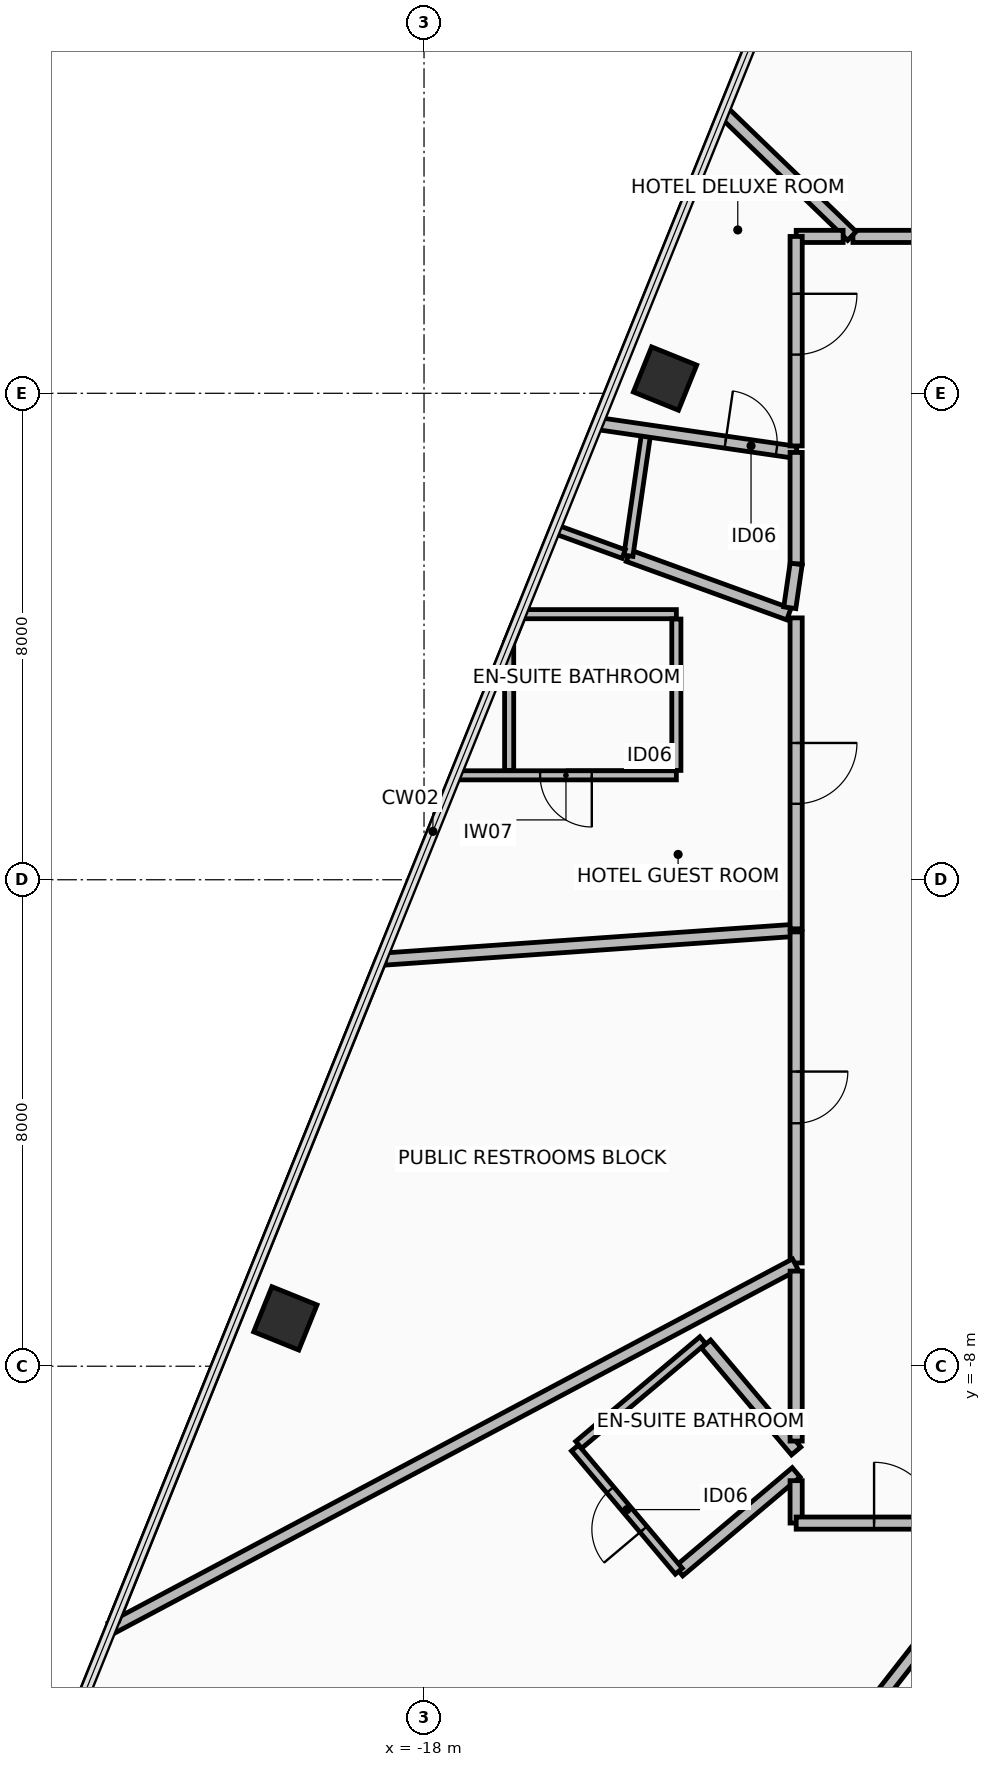
"""IFC4 building model, lengths in metres.
Left out: names, types, materials, properties, quantities, classifications, styles, units other than length and angle.
Written with IfcOpenShell. Run it as: python <this file> out.ifc"""

import sys

from ifc_helpers import new_model, si_unit, direction, frame, frame_2d, origin, origin_2d, place, context, subcontext, project, spatial, rectangle, hollow_rectangle, extrude, element, fill, save


model = new_model("IFC4")
c1 = context("Model", 3, precision=1e-05, world=origin(), true_north=direction((0.0, 1.0)))
c2 = subcontext(c1, "Body", "Model", "MODEL_VIEW")
j1 = project(units=[si_unit("LENGTHUNIT", "METRE"), si_unit("PLANEANGLEUNIT", "RADIAN")], contexts=[c1])
p1 = place(None, origin())
s1 = spatial("IfcSite", under=j1, at=p1, CompositionType="ELEMENT")
p2 = place(p1, origin())
s2 = spatial("IfcBuilding", under=s1, at=p2, CompositionType="ELEMENT")
p3 = place(p2, frame((0.0, 0.0, 57.0)))
s3 = spatial("IfcBuildingStorey", under=s2, at=p3, CompositionType="ELEMENT", Elevation=57.0)
p4 = place(p3, frame((-14.036, 8.242, -0.19), z_axis=(0.0, 0.0, 1.0), x_axis=(0.374608211656, 0.927183200754, 0.0)))
e1 = element("IfcColumn", 1, at=p4, inside=s3, PredefinedType="COLUMN", context=c2, shape_type="SweptSolid", body=[
    extrude(hollow_rectangle(XDim=0.8, YDim=0.8, WallThickness=0.045, at=origin_2d()), origin(), (0.0, 0.0, 1.0), 3.64),
])
p5 = place(p3, frame((-20.281, -7.213, 0.0), z_axis=(0.0, 0.0, 1.0), x_axis=(0.374608211656, 0.927183200754, 0.0)))
e2 = element("IfcColumn", 2, at=p5, inside=s3, PredefinedType="COLUMN", context=c2, shape_type="SweptSolid", body=[
    extrude(hollow_rectangle(XDim=0.8, YDim=0.8, WallThickness=0.045, at=origin_2d()), origin(), (0.0, 0.0, 1.0), 3.45),
])
p6 = place(p3, frame((-12.0, 4.368, 0.0), z_axis=(0.0, 0.0, 1.0), x_axis=(-0.939689330019, 0.342029184499, 0.0)))
e3 = element("IfcWall", 3, at=p6, inside=s3, PredefinedType="PARTITIONING", context=c2, shape_type="SweptSolid", body=[
    extrude(rectangle(XDim=2.809, YDim=0.2, at=frame_2d((1.404, 0.0))), origin(), (0.0, 0.0, 1.0), 2.87),
])
p7 = place(p3, frame((-14.639, 5.328, 0.0), z_axis=(0.0, 0.0, 1.0), x_axis=(0.143755820494, 0.989613189117, 0.0)))
e4 = element("IfcWall", 4, at=p7, inside=s3, PredefinedType="PARTITIONING", context=c2, shape_type="SweptSolid", body=[
    extrude(rectangle(XDim=2.079, YDim=0.15, at=frame_2d((1.039, 0.0))), origin(), (0.0, 0.0, 1.0), 2.47),
])
p8 = place(p3, frame((-15.144, 7.502, 0.0), z_axis=(0.0, 0.0, 1.0), x_axis=(0.989616702709, -0.143731630892, 0.0)))
e5 = element("IfcWall", 5, at=p8, inside=s3, PredefinedType="PARTITIONING", context=c2, shape_type="SweptSolid", body=[
    extrude(rectangle(XDim=3.299, YDim=0.2, at=frame_2d((1.649, 0.0))), origin(), (0.0, 0.0, 1.0), 2.47),
])
p9 = place(p8, frame((2.124, 0.0, 0.0)))
e6 = element("IfcOpeningElement", 6, at=p9, cuts=e5, PredefinedType="OPENING", context=c2, shape_type="SweptSolid", body=[
    extrude(rectangle(XDim=0.85, YDim=2.1, at=frame_2d((0.425, 1.05))), frame((0.0, 0.11, 0.0), z_axis=(0.0, -1.0, 0.0), x_axis=(1.0, 0.0, 0.0)), (0.0, 0.0, 1.0), 0.22),
])
p10 = place(p3, frame((-11.88, 7.028, 0.0), z_axis=(0.0, 0.0, 1.0), x_axis=(0.0, -1.0, 0.0)))
e7 = element("IfcWall", 7, at=p10, inside=s3, PredefinedType="PARTITIONING", context=c2, shape_type="SweptSolid", body=[
    extrude(rectangle(XDim=1.834, YDim=0.2, at=frame_2d((0.917, 0.0))), origin(), (0.0, 0.0, 1.0), 2.87),
])
p11 = place(p3, frame((-11.88, 5.194, 0.0), z_axis=(0.0, 0.0, 1.0), x_axis=(-0.143909981619, -0.989590782693, 0.0)))
e8 = element("IfcWall", 8, at=p11, inside=s3, PredefinedType="PARTITIONING", context=c2, shape_type="SweptSolid", body=[
    extrude(rectangle(XDim=0.728, YDim=0.2, at=frame_2d((0.364, 0.0))), origin(), (0.0, 0.0, 1.0), 3.275),
])
p12 = place(p3, frame((-13.85, 1.718, 0.0), z_axis=(0.0, 0.0, 1.0), x_axis=(-1.0, 0.0, 0.0)))
e9 = element("IfcWall", 9, at=p12, inside=s3, PredefinedType="PARTITIONING", context=c2, shape_type="SweptSolid", body=[
    extrude(rectangle(XDim=3.631, YDim=0.15, at=frame_2d((1.816, 0.0))), origin(), (0.0, 0.0, 1.0), 2.47),
])
p13 = place(p12, frame((1.391, 0.0, 0.0)))
e10 = element("IfcOpeningElement", 10, at=p13, cuts=e9, PredefinedType="OPENING", context=c2, shape_type="SweptSolid", body=[
    extrude(rectangle(XDim=0.85, YDim=2.1, at=frame_2d((0.425, 1.05))), frame((0.0, 0.085, 0.0), z_axis=(0.0, -1.0, 0.0), x_axis=(1.0, 0.0, 0.0)), (0.0, 0.0, 1.0), 0.17),
])
p14 = place(p3, frame((-16.6, 1.798, 0.0), z_axis=(0.0, 0.0, 1.0), x_axis=(0.0, 1.0, 0.0)))
e11 = element("IfcWall", 11, at=p14, inside=s3, PredefinedType="PARTITIONING", context=c2, shape_type="SweptSolid", body=[
    extrude(rectangle(XDim=2.102, YDim=0.15, at=frame_2d((1.051, 0.0))), origin(), (0.0, 0.0, 1.0), 2.47),
])
p15 = place(p3, frame((-16.6, 3.899, 0.0), z_axis=(0.0, 0.0, 1.0), x_axis=(0.374886357565, 0.92707077341, 0.0)))
e12 = element("IfcWall", 12, at=p15, inside=s3, PredefinedType="PARTITIONING", context=c2, shape_type="SweptSolid", body=[
    extrude(rectangle(XDim=0.505, YDim=0.15, at=frame_2d((0.253, 0.0))), origin(), (0.0, 0.0, 1.0), 3.275),
])
p16 = place(p3, frame((-16.411, 4.368, 0.0), z_axis=(0.0, 0.0, 1.0), x_axis=(1.0, 0.0, 0.0)))
e13 = element("IfcWall", 13, at=p16, inside=s3, PredefinedType="PARTITIONING", context=c2, shape_type="SweptSolid", body=[
    extrude(rectangle(XDim=2.561, YDim=0.15, at=frame_2d((1.28, 0.0))), origin(), (0.0, 0.0, 1.0), 2.47),
])
p17 = place(p3, frame((-13.85, 4.288, 0.0), z_axis=(0.0, 0.0, 1.0), x_axis=(0.0, -1.0, 0.0)))
e14 = element("IfcWall", 14, at=p17, inside=s3, PredefinedType="PARTITIONING", context=c2, shape_type="SweptSolid", body=[
    extrude(rectangle(XDim=2.49, YDim=0.15, at=frame_2d((1.245, 0.0))), origin(), (0.0, 0.0, 1.0), 3.275),
])
p18 = place(p3, frame((-11.88, -9.745, 0.0), z_axis=(0.0, 0.0, 1.0), x_axis=(-0.764712982519, -0.644371053328, 0.0)))
e15 = element("IfcWall", 15, at=p18, inside=s3, PredefinedType="PARTITIONING", context=c2, shape_type="SweptSolid", body=[
    extrude(rectangle(XDim=2.524, YDim=0.2, at=frame_2d((1.262, 0.0))), origin(), (0.0, 0.0, 1.0), 3.275),
])
p19 = place(p3, frame((-13.81, -11.371, 0.0), z_axis=(0.0, 0.0, 1.0), x_axis=(-0.644478981733, 0.764622025647, 0.0)))
e16 = element("IfcWall", 16, at=p19, inside=s3, PredefinedType="PARTITIONING", context=c2, shape_type="SweptSolid", body=[
    extrude(rectangle(XDim=2.65, YDim=0.15, at=frame_2d((1.325, 0.0))), origin(), (0.0, 0.0, 1.0), 2.87),
])
p20 = place(p19, frame((0.9, 0.0, 0.0)))
e17 = element("IfcOpeningElement", 17, at=p20, cuts=e16, PredefinedType="OPENING", context=c2, shape_type="SweptSolid", body=[
    extrude(rectangle(XDim=0.85, YDim=2.1, at=frame_2d((0.425, 1.05))), frame((0.0, 0.085, 0.0), z_axis=(0.0, -1.0, 0.0), x_axis=(1.0, 0.0, 0.0)), (0.0, 0.0, 1.0), 0.17),
])
p21 = place(p3, frame((-15.456, -9.293, 0.0), z_axis=(0.0, 0.0, 1.0), x_axis=(0.764709608169, 0.644375057846, 0.0)))
e18 = element("IfcWall", 18, at=p21, inside=s3, PredefinedType="PARTITIONING", context=c2, shape_type="SweptSolid", body=[
    extrude(rectangle(XDim=2.67, YDim=0.15, at=frame_2d((1.335, 0.0))), origin(), (0.0, 0.0, 1.0), 2.67),
])
p22 = place(p3, frame((-13.363, -7.634, 0.0), z_axis=(0.0, 0.0, 1.0), x_axis=(0.644400290836, -0.764688345125, 0.0)))
e19 = element("IfcWall", 19, at=p22, inside=s3, PredefinedType="PARTITIONING", context=c2, shape_type="SweptSolid", body=[
    extrude(rectangle(XDim=2.302, YDim=0.2, at=frame_2d((1.151, 0.0))), origin(), (0.0, 0.0, 1.0), 2.67),
])
p23 = place(p3, frame((-18.688, -1.307, 0.0), z_axis=(0.0, 0.0, 1.0), x_axis=(0.997562443225, 0.069779451603, 0.0)))
e20 = element("IfcWall", 20, at=p23, inside=s3, PredefinedType="PARTITIONING", context=c2, shape_type="SweptSolid", body=[
    extrude(rectangle(XDim=6.798, YDim=0.2, at=frame_2d((3.399, 0.0))), origin(), (0.0, 0.0, 1.0), 2.47),
])
p24 = place(p3, frame((-11.88, -0.857, 0.0), z_axis=(0.0, 0.0, 1.0), x_axis=(0.0, -1.0, 0.0)))
e21 = element("IfcWall", 21, at=p24, inside=s3, PredefinedType="PARTITIONING", context=c2, shape_type="SweptSolid", body=[
    extrude(rectangle(XDim=5.444, YDim=0.2, at=frame_2d((2.722, 0.0))), origin(), (0.0, 0.0, 1.0), 3.275),
])
p25 = place(p24, frame((2.297, 0.0, 0.0)))
e22 = element("IfcOpeningElement", 22, at=p25, cuts=e21, PredefinedType="OPENING", context=c2, shape_type="SweptSolid", body=[
    extrude(rectangle(XDim=0.85, YDim=2.1, at=frame_2d((0.425, 1.05))), frame((0.0, 0.11, 0.0), z_axis=(0.0, -1.0, 0.0), x_axis=(1.0, 0.0, 0.0)), (0.0, 0.0, 1.0), 0.22),
])
p26 = place(p3, frame((-11.893, -6.324, 0.0), z_axis=(0.0, 0.0, 1.0), x_axis=(-0.882946043117, -0.469474477416, 0.0)))
e23 = element("IfcWall", 23, at=p26, inside=s3, PredefinedType="PARTITIONING", context=c2, shape_type="SweptSolid", body=[
    extrude(rectangle(XDim=12.747, YDim=0.2, at=frame_2d((6.374, 0.0))), origin(), (0.0, 0.0, 1.0), 2.47),
])
p27 = place(p3, frame((-23.087, -12.156, 0.0), z_axis=(0.0, 0.0, 1.0), x_axis=(0.374605375648, 0.927184346576, 0.0)))
e24 = element("IfcWall", 24, at=p27, inside=s3, PredefinedType="PARTITIONING", context=c2, shape_type="SweptSolid", body=[
    extrude(rectangle(XDim=11.685, YDim=0.15, at=frame_2d((5.842, 0.0))), origin(), (0.0, 0.0, 1.0), 3.275),
])
p28 = place(p3, frame((-4.312, 10.58, 0.0), z_axis=(0.0, 0.0, 1.0), x_axis=(-1.0, 0.0, 0.0)))
e25 = element("IfcWall", 25, at=p28, inside=s3, PredefinedType="PARTITIONING", context=c2, shape_type="SweptSolid", body=[
    extrude(rectangle(XDim=6.634, YDim=0.2, at=frame_2d((3.317, 0.0))), origin(), (0.0, 0.0, 1.0), 2.62),
])
p29 = place(p28, frame((2.817, 0.0, 0.0)))
e26 = element("IfcOpeningElement", 26, at=p29, cuts=e25, PredefinedType="OPENING", context=c2, shape_type="SweptSolid", body=[
    extrude(rectangle(XDim=1.0, YDim=2.15, at=frame_2d((0.5, 1.075))), frame((0.0, 0.11, 0.0), z_axis=(0.0, -1.0, 0.0), x_axis=(1.0, 0.0, 0.0)), (0.0, 0.0, 1.0), 0.22),
])
p30 = place(p3, frame((-10.963, 10.587, 0.0), z_axis=(0.0, 0.0, 1.0), x_axis=(-0.719299093908, 0.69470052073, 0.0)))
e27 = element("IfcWall", 27, at=p30, inside=s3, PredefinedType="PARTITIONING", context=c2, shape_type="SweptSolid", body=[
    extrude(rectangle(XDim=2.918, YDim=0.2, at=frame_2d((1.459, 0.0))), origin(), (0.0, 0.0, 1.0), 2.47),
])
p31 = place(p3, frame((-11.107, 10.58, 0.0), z_axis=(0.0, 0.0, 1.0), x_axis=(-1.0, 0.0, 0.0)))
e28 = element("IfcWall", 28, at=p31, inside=s3, PredefinedType="PARTITIONING", context=c2, shape_type="SweptSolid", body=[
    extrude(rectangle(XDim=0.772, YDim=0.2, at=frame_2d((0.386, 0.0))), origin(), (0.0, 0.0, 1.0), 3.275),
])
p32 = place(p3, frame((-11.88, 10.579, 0.0), z_axis=(0.0, 0.0, 1.0), x_axis=(0.0, -1.0, 0.0)))
e29 = element("IfcWall", 29, at=p32, inside=s3, PredefinedType="PARTITIONING", context=c2, shape_type="SweptSolid", body=[
    extrude(rectangle(XDim=3.445, YDim=0.2, at=frame_2d((1.723, 0.0))), origin(), (0.0, 0.0, 1.0), 2.67),
])
p33 = place(p32, frame((0.943, 0.0, 0.0)))
e30 = element("IfcOpeningElement", 30, at=p33, cuts=e29, PredefinedType="OPENING", context=c2, shape_type="SweptSolid", body=[
    extrude(rectangle(XDim=1.0, YDim=2.15, at=frame_2d((0.5, 1.075))), frame((0.0, 0.11, 0.0), z_axis=(0.0, -1.0, 0.0), x_axis=(1.0, 0.0, 0.0)), (0.0, 0.0, 1.0), 0.22),
])
p34 = place(p3, frame((-14.716, 5.356, 0.0), z_axis=(0.0, 0.0, 1.0), x_axis=(-0.939690305464, 0.342026504552, 0.0)))
e31 = element("IfcWall", 31, at=p34, inside=s3, PredefinedType="PARTITIONING", context=c2, shape_type="SweptSolid", body=[
    extrude(rectangle(XDim=1.176, YDim=0.15, at=frame_2d((0.588, 0.0))), origin(), (0.0, 0.0, 1.0), 2.47),
])
p35 = place(p3, frame((-11.88, 4.306, 0.0), z_axis=(0.0, 0.0, 1.0), x_axis=(0.0, -1.0, 0.0)))
e32 = element("IfcWall", 32, at=p35, inside=s3, PredefinedType="PARTITIONING", context=c2, shape_type="SweptSolid", body=[
    extrude(rectangle(XDim=5.114, YDim=0.2, at=frame_2d((2.557, 0.0))), origin(), (0.0, 0.0, 1.0), 3.275),
])
p36 = place(p35, frame((2.057, 0.0, 0.0)))
e33 = element("IfcOpeningElement", 33, at=p36, cuts=e32, PredefinedType="OPENING", context=c2, shape_type="SweptSolid", body=[
    extrude(rectangle(XDim=1.0, YDim=2.15, at=frame_2d((0.5, 1.075))), frame((0.0, 0.11, 0.0), z_axis=(0.0, -1.0, 0.0), x_axis=(1.0, 0.0, 0.0)), (0.0, 0.0, 1.0), 0.22),
])
p37 = place(p3, frame((-11.88, -6.436, 0.0), z_axis=(0.0, 0.0, 1.0), x_axis=(0.0, -1.0, 0.0)))
e34 = element("IfcWall", 34, at=p37, inside=s3, PredefinedType="PARTITIONING", context=c2, shape_type="SweptSolid", body=[
    extrude(rectangle(XDim=2.795, YDim=0.2, at=frame_2d((1.397, 0.0))), origin(), (0.0, 0.0, 1.0), 2.67),
])
p38 = place(p3, frame((-11.88, -9.882, 0.0), z_axis=(0.0, 0.0, 1.0), x_axis=(0.0, -1.0, 0.0)))
e35 = element("IfcWall", 35, at=p38, inside=s3, PredefinedType="PARTITIONING", context=c2, shape_type="SweptSolid", body=[
    extrude(rectangle(XDim=0.697, YDim=0.2, at=frame_2d((0.349, 0.0))), origin(), (0.0, 0.0, 1.0), 2.67),
])
p39 = place(p3, frame((-11.879, -10.58, 0.0), z_axis=(0.0, 0.0, 1.0), x_axis=(1.0, 0.0, 0.0)))
e36 = element("IfcWall", 36, at=p39, inside=s3, PredefinedType="PARTITIONING", context=c2, shape_type="SweptSolid", body=[
    extrude(rectangle(XDim=3.562, YDim=0.2, at=frame_2d((1.781, 0.0))), origin(), (0.0, 0.0, 1.0), 2.67),
])
p40 = place(p39, frame((1.281, 0.0, 0.0)))
e37 = element("IfcOpeningElement", 37, at=p40, cuts=e36, PredefinedType="OPENING", context=c2, shape_type="SweptSolid", body=[
    extrude(rectangle(XDim=1.0, YDim=2.15, at=frame_2d((0.5, 1.075))), frame((0.0, 0.11, 0.0), z_axis=(0.0, -1.0, 0.0), x_axis=(1.0, 0.0, 0.0)), (0.0, 0.0, 1.0), 0.22),
])
p41 = place(p3, frame((-8.348, -10.685, 0.0), z_axis=(0.0, 0.0, 1.0), x_axis=(-0.615661230884, -0.788010944585, 0.0)))
e38 = element("IfcWall", 38, at=p41, inside=s3, PredefinedType="PARTITIONING", context=c2, shape_type="SweptSolid", body=[
    extrude(rectangle(XDim=20.121, YDim=0.2, at=frame_2d((10.06, 0.0))), origin(), (0.0, 0.0, 1.0), 2.47),
])
p42 = place(p9, origin())
e39 = element("IfcDoor", 39, at=p42, inside=s3, OperationType="SINGLE_SWING_RIGHT", PredefinedType="DOOR", context=c2, shape_type="SweptSolid", body=[
    extrude(rectangle(XDim=0.85, YDim=2.1, at=frame_2d((0.425, 1.05))), frame((0.0, 0.025, 0.0), z_axis=(0.0, -1.0, 0.0), x_axis=(1.0, 0.0, 0.0)), (0.0, 0.0, 1.0), 0.05),
])
fill(e6, e39)
p43 = place(p13, origin())
e40 = element("IfcDoor", 40, at=p43, inside=s3, OperationType="SINGLE_SWING_RIGHT", PredefinedType="DOOR", context=c2, shape_type="SweptSolid", body=[
    extrude(rectangle(XDim=0.85, YDim=2.1, at=frame_2d((0.425, 1.05))), frame((0.0, 0.025, 0.0), z_axis=(0.0, -1.0, 0.0), x_axis=(1.0, 0.0, 0.0)), (0.0, 0.0, 1.0), 0.05),
])
fill(e10, e40)
p44 = place(p20, origin())
e41 = element("IfcDoor", 41, at=p44, inside=s3, OperationType="SINGLE_SWING_RIGHT", PredefinedType="DOOR", context=c2, shape_type="SweptSolid", body=[
    extrude(rectangle(XDim=0.85, YDim=2.1, at=frame_2d((0.425, 1.05))), frame((0.0, 0.025, 0.0), z_axis=(0.0, -1.0, 0.0), x_axis=(1.0, 0.0, 0.0)), (0.0, 0.0, 1.0), 0.05),
])
fill(e17, e41)
p45 = place(p25, origin())
e42 = element("IfcDoor", 42, at=p45, inside=s3, OperationType="SINGLE_SWING_RIGHT", PredefinedType="DOOR", context=c2, shape_type="SweptSolid", body=[
    extrude(rectangle(XDim=0.85, YDim=2.1, at=frame_2d((0.425, 1.05))), frame((0.0, 0.025, 0.0), z_axis=(0.0, -1.0, 0.0), x_axis=(1.0, 0.0, 0.0)), (0.0, 0.0, 1.0), 0.05),
])
fill(e22, e42)
p46 = place(p33, origin())
e43 = element("IfcDoor", 43, at=p46, inside=s3, OperationType="SINGLE_SWING_LEFT", PredefinedType="DOOR", context=c2, shape_type="SweptSolid", body=[
    extrude(rectangle(XDim=1.0, YDim=2.15, at=frame_2d((0.5, 1.075))), frame((0.0, 0.025, 0.0), z_axis=(0.0, -1.0, 0.0), x_axis=(1.0, 0.0, 0.0)), (0.0, 0.0, 1.0), 0.05),
])
fill(e30, e43)
p47 = place(p36, origin())
e44 = element("IfcDoor", 44, at=p47, inside=s3, OperationType="SINGLE_SWING_LEFT", PredefinedType="DOOR", context=c2, shape_type="SweptSolid", body=[
    extrude(rectangle(XDim=1.0, YDim=2.15, at=frame_2d((0.5, 1.075))), frame((0.0, 0.025, 0.0), z_axis=(0.0, -1.0, 0.0), x_axis=(1.0, 0.0, 0.0)), (0.0, 0.0, 1.0), 0.05),
])
fill(e33, e44)
p48 = place(p40, origin())
e45 = element("IfcDoor", 45, at=p48, inside=s3, OperationType="SINGLE_SWING_LEFT", PredefinedType="DOOR", context=c2, shape_type="SweptSolid", body=[
    extrude(rectangle(XDim=1.0, YDim=2.15, at=frame_2d((0.5, 1.075))), frame((0.0, 0.025, 0.0), z_axis=(0.0, -1.0, 0.0), x_axis=(1.0, 0.0, 0.0)), (0.0, 0.0, 1.0), 0.05),
])
fill(e37, e45)
save(model, sys.argv[1])
